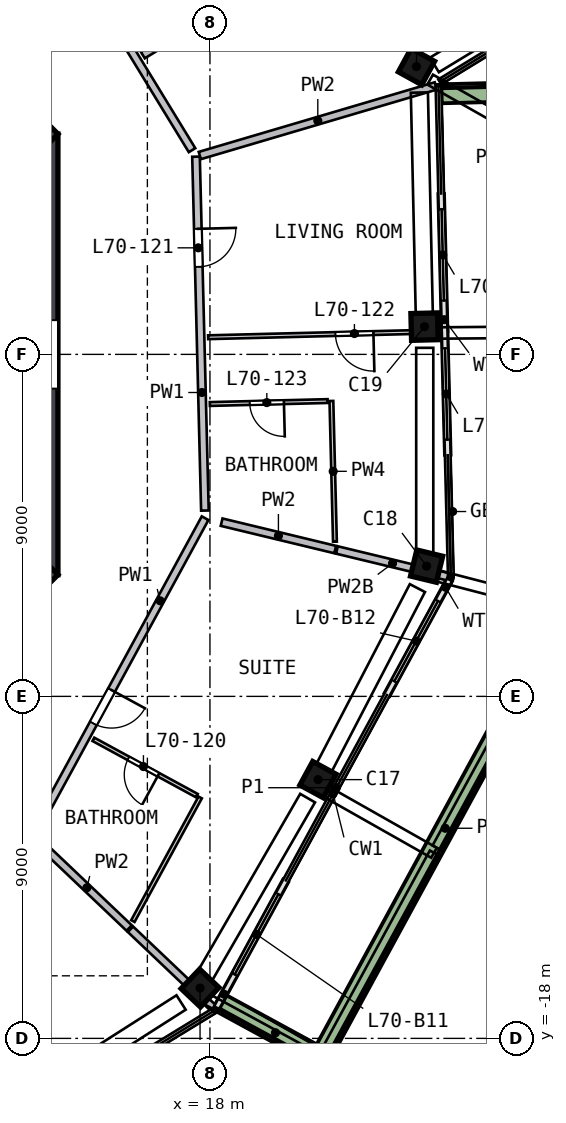
"""IFC4 building model, lengths in metres.
Left out: names, types, materials, properties, quantities, classifications, styles, units other than length and angle.
Written with IfcOpenShell. Run it as: python <this file> out.ifc"""

import sys

from ifc_helpers import new_model, si_unit, direction, frame, frame_2d, origin, origin_2d, place, context, subcontext, project, spatial, rectangle, extrude, element, fill, save


model = new_model("IFC4")
c1 = context("Model", 3, precision=1e-05, world=origin(), true_north=direction((0.0, 1.0)))
c2 = subcontext(c1, "Body", "Model", "MODEL_VIEW")
j1 = project(units=[si_unit("LENGTHUNIT", "METRE"), si_unit("PLANEANGLEUNIT", "RADIAN")], contexts=[c1])
p1 = place(None, origin())
s1 = spatial("IfcSite", under=j1, at=p1, CompositionType="ELEMENT")
p2 = place(p1, origin())
s2 = spatial("IfcBuilding", under=s1, at=p2, CompositionType="ELEMENT")
p3 = place(p2, frame((0.0, 0.0, 284.5)))
s3 = spatial("IfcBuildingStorey", under=s2, at=p3, CompositionType="ELEMENT", Elevation=284.5)
p4 = place(p3, frame((17.644, -16.779, 0.0), z_axis=(0.079060431, 0.084609865, 0.993272681), x_axis=(-0.684283954, -0.719963223, 0.115794763)))
e1 = element("IfcColumn", 1, at=p4, inside=s3, PredefinedType="COLUMN", context=c2, shape_type="SweptSolid", body=[
    extrude(rectangle(XDim=0.7, YDim=0.7, at=origin_2d()), origin(), (0.0, 0.0, 1.0), 3.211),
])
p5 = place(p3, frame((20.78, -11.311, 0.0), z_axis=(0.053005442, 0.099318662, 0.993642907), x_axis=(0.475262413, 0.872612609, -0.112573854)))
e2 = element("IfcColumn", 2, at=p5, inside=s3, PredefinedType="COLUMN", context=c2, shape_type="SweptSolid", body=[
    extrude(rectangle(XDim=0.7, YDim=0.7, at=origin_2d()), origin(), (0.0, 0.0, 1.0), 3.21),
])
p6 = place(p3, frame((23.669, -5.709, 0.0), z_axis=(0.026226708, 0.112812856, 0.993270064), x_axis=(-0.233123432, -0.96552568, 0.115817212)))
e3 = element("IfcColumn", 3, at=p6, inside=s3, PredefinedType="COLUMN", context=c2, shape_type="SweptSolid", body=[
    extrude(rectangle(XDim=0.7, YDim=0.7, at=origin_2d()), origin(), (0.0, 0.0, 1.0), 3.212),
])
p7 = place(p3, frame((23.651, 0.594, 0.0), z_axis=(-0.003726368, 0.112475484, 0.993647513), x_axis=(-0.024473849, 0.993346521, -0.112533195)))
e4 = element("IfcColumn", 4, at=p7, inside=s3, PredefinedType="COLUMN", context=c2, shape_type="SweptSolid", body=[
    extrude(rectangle(XDim=0.7, YDim=0.7, at=origin_2d()), origin(), (0.0, 0.0, 1.0), 3.21),
])
p8 = place(p3, frame((23.479, 7.439, 0.0), z_axis=(-0.036255778, 0.111351605, 0.993119499), x_axis=(-0.482935989, -0.871980865, 0.080138642)))
e5 = element("IfcColumn", 5, at=p8, inside=s3, PredefinedType="COLUMN", context=c2, shape_type="SweptSolid", body=[
    extrude(rectangle(XDim=0.7, YDim=0.7, at=origin_2d()), origin(), (0.0, 0.0, 1.0), 3.212),
])
p9 = place(p3, frame((13.775, -5.799, 0.0), z_axis=(0.0, 0.0, 1.0), x_axis=(0.0, 1.0, 0.0)))
e6 = element("IfcWall", 6, at=p9, inside=s3, PredefinedType="SHEAR", context=c2, shape_type="SweptSolid", body=[
    extrude(rectangle(XDim=11.598, YDim=0.45, at=frame_2d((5.799, 0.0))), origin(), (0.0, 0.0, 1.0), 3.5),
])
p10 = place(p9, frame((4.899, 0.0, 0.0)))
e7 = element("IfcOpeningElement", 7, at=p10, cuts=e6, PredefinedType="OPENING", context=c2, shape_type="SweptSolid", body=[
    extrude(rectangle(XDim=1.8, YDim=2.1, at=frame_2d((0.9, 1.05))), frame((0.0, 0.235, 0.0), z_axis=(0.0, -1.0, 0.0), x_axis=(1.0, 0.0, 0.0)), (0.0, 0.0, 1.0), 0.47),
])
p11 = place(p3, frame((13.841, 5.64, 0.0), z_axis=(0.0, 0.0, 1.0), x_axis=(-0.707106781, 0.707106781, 0.0)))
e8 = element("IfcWall", 8, at=p11, inside=s3, PredefinedType="SHEAR", context=c2, shape_type="SweptSolid", body=[
    extrude(rectangle(XDim=11.598, YDim=0.45, at=frame_2d((5.799, 0.0))), origin(), (0.0, 0.0, 1.0), 3.5),
])
p12 = place(p11, frame((2.099, 0.0, 0.0)))
e9 = element("IfcOpeningElement", 9, at=p12, cuts=e8, PredefinedType="OPENING", context=c2, shape_type="SweptSolid", body=[
    extrude(rectangle(XDim=1.2, YDim=2.1, at=frame_2d((0.6, 1.05))), frame((0.0, 0.235, 0.0), z_axis=(0.0, -1.0, 0.0), x_axis=(1.0, 0.0, 0.0)), (0.0, 0.0, 1.0), 0.47),
])
p13 = place(p3, frame((5.64, -13.841, 0.0), z_axis=(0.0, 0.0, 1.0), x_axis=(0.707106781, 0.707106781, 0.0)))
e10 = element("IfcWall", 10, at=p13, inside=s3, PredefinedType="SHEAR", context=c2, shape_type="SweptSolid", body=[
    extrude(rectangle(XDim=11.598, YDim=0.45, at=frame_2d((5.799, 0.0))), origin(), (0.0, 0.0, 1.0), 3.5),
])
p14 = place(p13, frame((2.099, 0.0, 0.0)))
e11 = element("IfcOpeningElement", 11, at=p14, cuts=e10, PredefinedType="OPENING", context=c2, shape_type="SweptSolid", body=[
    extrude(rectangle(XDim=1.2, YDim=2.1, at=frame_2d((0.6, 1.05))), frame((0.0, 0.235, 0.0), z_axis=(0.0, -1.0, 0.0), x_axis=(1.0, 0.0, 0.0)), (0.0, 0.0, 1.0), 0.47),
])
p15 = place(p3, frame((18.181, -17.183, 0.0), z_axis=(0.0, 0.0, 1.0), x_axis=(0.478120193, 0.878294416, 0.0)))
e12 = element("IfcWall", 12, at=p15, inside=s3, PredefinedType="SOLIDWALL", context=c2, shape_type="SweptSolid", body=[
    extrude(rectangle(XDim=3.787, YDim=0.15, at=frame_2d((1.894, 0.0))), origin(), (0.0, 0.0, 1.0), 2.525),
])
p16 = place(p15, frame((0.987, 0.0, 0.0)))
e13 = element("IfcOpeningElement", 13, at=p16, cuts=e12, PredefinedType="OPENING", context=c2, shape_type="SweptSolid", body=[
    extrude(rectangle(XDim=2.4, YDim=2.4, at=frame_2d((1.2, 1.2))), frame((0.0, 0.085, 0.0), z_axis=(0.0, -1.0, 0.0), x_axis=(1.0, 0.0, 0.0)), (0.0, 0.0, 1.0), 0.17),
])
p17 = place(p3, frame((22.662, -8.95, 0.0), z_axis=(0.0, 0.0, 1.0), x_axis=(0.478118196, 0.878295503, 0.0)))
e14 = element("IfcWall", 14, at=p17, inside=s3, PredefinedType="SOLIDWALL", context=c2, shape_type="SweptSolid", body=[
    extrude(rectangle(XDim=3.427, YDim=0.15, at=frame_2d((1.713, 0.0))), origin(), (0.0, 0.0, 1.0), 2.525),
])
p18 = place(p17, frame((0.4, 0.0, 0.0)))
e15 = element("IfcOpeningElement", 15, at=p18, cuts=e14, PredefinedType="OPENING", context=c2, shape_type="SweptSolid", body=[
    extrude(rectangle(XDim=2.4, YDim=2.4, at=frame_2d((1.2, 1.2))), frame((0.0, 0.085, 0.0), z_axis=(0.0, -1.0, 0.0), x_axis=(1.0, 0.0, 0.0)), (0.0, 0.0, 1.0), 0.17),
])
p19 = place(p3, frame((24.257, -2.641, 0.0), z_axis=(0.0, 0.0, 1.0), x_axis=(-0.025089785, 0.999685202, 0.0)))
e16 = element("IfcWall", 16, at=p19, inside=s3, PredefinedType="SOLIDWALL", context=c2, shape_type="SweptSolid", body=[
    extrude(rectangle(XDim=3.25, YDim=0.15, at=frame_2d((1.625, 0.0))), origin(), (0.0, 0.0, 1.0), 2.525),
])
p20 = place(p19, frame((0.4, 0.0, 0.0)))
e17 = element("IfcOpeningElement", 17, at=p20, cuts=e16, PredefinedType="OPENING", context=c2, shape_type="SweptSolid", body=[
    extrude(rectangle(XDim=2.4, YDim=2.4, at=frame_2d((1.2, 1.2))), frame((0.0, 0.085, 0.0), z_axis=(0.0, -1.0, 0.0), x_axis=(1.0, 0.0, 0.0)), (0.0, 0.0, 1.0), 0.17),
])
p21 = place(p3, frame((24.176, 0.608, 0.0), z_axis=(0.0, 0.0, 1.0), x_axis=(-0.025149276, 0.999683707, 0.0)))
e18 = element("IfcWall", 18, at=p21, inside=s3, PredefinedType="SOLIDWALL", context=c2, shape_type="SweptSolid", body=[
    extrude(rectangle(XDim=3.611, YDim=0.15, at=frame_2d((1.806, 0.0))), origin(), (0.0, 0.0, 1.0), 2.525),
])
p22 = place(p21, frame((0.811, 0.0, 0.0)))
e19 = element("IfcOpeningElement", 19, at=p22, cuts=e18, PredefinedType="OPENING", context=c2, shape_type="SweptSolid", body=[
    extrude(rectangle(XDim=2.4, YDim=2.4, at=frame_2d((1.2, 1.2))), frame((0.0, 0.085, 0.0), z_axis=(0.0, -1.0, 0.0), x_axis=(1.0, 0.0, 0.0)), (0.0, 0.0, 1.0), 0.17),
])
p23 = place(p3, frame((18.319, -17.087, 0.0), z_axis=(0.0, 0.0, 1.0), x_axis=(0.878332693, -0.478049873, 0.0)))
e20 = element("IfcWall", 20, at=p23, inside=s3, PredefinedType="SOLIDWALL", context=c2, shape_type="SweptSolid", body=[
    extrude(rectangle(XDim=3.199, YDim=0.5, at=frame_2d((1.6, 0.0))), origin(), (0.0, 0.0, 1.0), 0.7),
])
p24 = place(p3, frame((21.029, -18.278, 0.0), z_axis=(0.0, 0.0, 1.0), x_axis=(0.478078384, 0.878317174, 0.0)))
e21 = element("IfcWall", 21, at=p24, inside=s3, PredefinedType="SOLIDWALL", context=c2, shape_type="SweptSolid", body=[
    extrude(rectangle(XDim=13.223, YDim=0.5, at=frame_2d((6.612, 0.0))), origin(), (0.0, 0.0, 1.0), 0.7),
])
p25 = place(p3, frame((26.793, 6.926, 0.0), z_axis=(0.0, 0.0, 1.0), x_axis=(-0.999683736, -0.025148138, 0.0)))
e22 = element("IfcWall", 22, at=p25, inside=s3, PredefinedType="SOLIDWALL", context=c2, shape_type="SweptSolid", body=[
    extrude(rectangle(XDim=2.699, YDim=0.5, at=frame_2d((1.349, 0.0))), origin(), (0.0, 0.0, 1.0), 0.7),
])
p26 = place(p3, frame((12.669, 13.323, 0.0), z_axis=(0.0, 0.0, 1.0), x_axis=(0.521611117, -0.853183358, 0.0)))
e23 = element("IfcWall", 23, at=p26, inside=s3, PredefinedType="SOLIDWALL", context=c2, shape_type="SweptSolid", body=[
    extrude(rectangle(XDim=9.317, YDim=0.2, at=frame_2d((4.658, 0.0))), origin(), (0.0, 0.0, 1.0), 3.19),
])
p27 = place(p26, frame((3.865, 0.0, 0.0)))
e24 = element("IfcOpeningElement", 24, at=p27, cuts=e23, PredefinedType="OPENING", context=c2, shape_type="SweptSolid", body=[
    extrude(rectangle(XDim=1.8, YDim=2.1, at=frame_2d((0.9, 1.05))), frame((0.0, 0.11, 0.0), z_axis=(0.0, -1.0, 0.0), x_axis=(1.0, 0.0, 0.0)), (0.0, 0.0, 1.0), 0.22),
])
p28 = place(p3, frame((17.872, -4.311, 0.0), z_axis=(0.0, 0.0, 1.0), x_axis=(-0.478084491, -0.87831385, 0.0)))
e25 = element("IfcWall", 25, at=p28, inside=s3, PredefinedType="SOLIDWALL", context=c2, shape_type="SweptSolid", body=[
    extrude(rectangle(XDim=9.317, YDim=0.2, at=frame_2d((4.658, 0.0))), origin(), (0.0, 0.0, 1.0), 3.19),
])
p29 = place(p28, frame((5.15, 0.0, 0.0)))
e26 = element("IfcOpeningElement", 26, at=p29, cuts=e25, PredefinedType="OPENING", context=c2, shape_type="SweptSolid", body=[
    extrude(rectangle(XDim=1.0, YDim=2.1, at=frame_2d((0.5, 1.05))), frame((0.0, 0.11, 0.0), z_axis=(0.0, -1.0, 0.0), x_axis=(1.0, 0.0, 0.0)), (0.0, 0.0, 1.0), 0.22),
])
p30 = place(p3, frame((17.633, 5.203, 0.0), z_axis=(0.0, 0.0, 1.0), x_axis=(0.025130335, -0.999684183, 0.0)))
e27 = element("IfcWall", 27, at=p30, inside=s3, PredefinedType="SOLIDWALL", context=c2, shape_type="SweptSolid", body=[
    extrude(rectangle(XDim=9.317, YDim=0.2, at=frame_2d((4.658, 0.0))), origin(), (0.0, 0.0, 1.0), 3.19),
])
p31 = place(p30, frame((1.9, 0.0, 0.0)))
e28 = element("IfcOpeningElement", 28, at=p31, cuts=e27, PredefinedType="OPENING", context=c2, shape_type="SweptSolid", body=[
    extrude(rectangle(XDim=1.0, YDim=2.1, at=frame_2d((0.5, 1.05))), frame((0.0, 0.11, 0.0), z_axis=(0.0, -1.0, 0.0), x_axis=(1.0, 0.0, 0.0)), (0.0, 0.0, 1.0), 0.22),
])
p32 = place(p3, frame((13.647, -12.977, 0.0), z_axis=(0.0, 0.0, 1.0), x_axis=(0.724630592, -0.689137509, 0.0)))
e29 = element("IfcWall", 29, at=p32, inside=s3, PredefinedType="SOLIDWALL", context=c2, shape_type="SweptSolid", body=[
    extrude(rectangle(XDim=3.075, YDim=0.2, at=frame_2d((1.537, 0.0))), origin(), (0.0, 0.0, 1.0), 3.19),
])
p33 = place(p3, frame((15.908, -15.128, 0.0), z_axis=(0.0, 0.0, 1.0), x_axis=(0.724639029, -0.689128636, 0.0)))
e30 = element("IfcWall", 30, at=p33, inside=s3, PredefinedType="SOLIDWALL", context=c2, shape_type="SweptSolid", body=[
    extrude(rectangle(XDim=3.011, YDim=0.2, at=frame_2d((1.506, 0.0))), origin(), (0.0, 0.0, 1.0), 3.19),
])
p34 = place(p3, frame((18.307, -4.415, 0.0), z_axis=(0.0, 0.0, 1.0), x_axis=(0.972122163, -0.234474945, 0.0)))
e31 = element("IfcWall", 31, at=p34, inside=s3, PredefinedType="SOLIDWALL", context=c2, shape_type="SweptSolid", body=[
    extrude(rectangle(XDim=3.075, YDim=0.2, at=frame_2d((1.537, 0.0))), origin(), (0.0, 0.0, 1.0), 3.19),
])
p35 = place(p3, frame((24.98, 13.223, 0.0), z_axis=(0.0, 0.0, 1.0), x_axis=(-0.853195879, -0.521590637, 0.0)))
e32 = element("IfcWall", 32, at=p35, inside=s3, PredefinedType="SOLIDWALL", context=c2, shape_type="SweptSolid", body=[
    extrude(rectangle(XDim=10.252, YDim=0.2, at=frame_2d((5.126, 0.0))), origin(), (0.0, 0.0, 1.0), 3.19),
])
p36 = place(p35, frame((2.45, 0.0, 0.0)))
e33 = element("IfcOpeningElement", 33, at=p36, cuts=e32, PredefinedType="OPENING", context=c2, shape_type="SweptSolid", body=[
    extrude(rectangle(XDim=1.0, YDim=2.1, at=frame_2d((0.5, 1.05))), frame((0.0, 0.11, 0.0), z_axis=(0.0, -1.0, 0.0), x_axis=(1.0, 0.0, 0.0)), (0.0, 0.0, 1.0), 0.22),
])
p37 = place(p3, frame((23.944, 7.065, 0.0), z_axis=(0.0, 0.0, 1.0), x_axis=(-0.9591166, -0.283011215, 0.0)))
e34 = element("IfcWall", 34, at=p37, inside=s3, PredefinedType="SOLIDWALL", context=c2, shape_type="SweptSolid", body=[
    extrude(rectangle(XDim=6.476, YDim=0.2, at=frame_2d((3.238, 0.0))), origin(), (0.0, 0.0, 1.0), 3.19),
])
p38 = place(p3, frame((21.341, -5.147, 0.0), z_axis=(0.0, 0.0, 1.0), x_axis=(0.972121732, -0.234476735, 0.0)))
e35 = element("IfcWall", 35, at=p38, inside=s3, PredefinedType="SOLIDWALL", context=c2, shape_type="SweptSolid", body=[
    extrude(rectangle(XDim=3.011, YDim=0.2, at=frame_2d((1.506, 0.0))), origin(), (0.0, 0.0, 1.0), 2.69),
])
p39 = place(p3, frame((17.655, -11.612, 0.0), z_axis=(0.0, 0.0, 1.0), x_axis=(-0.87832263, 0.478068361, 0.0)))
e36 = element("IfcWall", 36, at=p39, inside=s3, PredefinedType="PARTITIONING", context=c2, shape_type="SweptSolid", body=[
    extrude(rectangle(XDim=3.1, YDim=0.1, at=frame_2d((1.55, 0.0))), origin(), (0.0, 0.0, 1.0), 3.19),
])
p40 = place(p39, frame((1.15, 0.0, 0.0)))
e37 = element("IfcOpeningElement", 37, at=p40, cuts=e36, PredefinedType="OPENING", context=c2, shape_type="SweptSolid", body=[
    extrude(rectangle(XDim=0.9, YDim=2.1, at=frame_2d((0.45, 1.05))), frame((0.0, 0.06, 0.0), z_axis=(0.0, -1.0, 0.0), x_axis=(1.0, 0.0, 0.0)), (0.0, 0.0, 1.0), 0.12),
])
p41 = place(p3, frame((17.743, -11.66, 0.0), z_axis=(0.0, 0.0, 1.0), x_axis=(-0.478053023, -0.878330978, 0.0)))
e38 = element("IfcWall", 38, at=p41, inside=s3, PredefinedType="PARTITIONING", context=c2, shape_type="SweptSolid", body=[
    extrude(rectangle(XDim=3.704, YDim=0.1, at=frame_2d((1.852, 0.0))), origin(), (0.0, 0.0, 1.0), 3.19),
])
p42 = place(p3, frame((21.096, -1.229, 0.0), z_axis=(0.0, 0.0, 1.0), x_axis=(-0.999684391, -0.025122051, 0.0)))
e39 = element("IfcWall", 39, at=p42, inside=s3, PredefinedType="PARTITIONING", context=c2, shape_type="SweptSolid", body=[
    extrude(rectangle(XDim=3.1, YDim=0.1, at=frame_2d((1.55, 0.0))), origin(), (0.0, 0.0, 1.0), 3.19),
])
p43 = place(p42, frame((1.15, 0.0, 0.0)))
e40 = element("IfcOpeningElement", 40, at=p43, cuts=e39, PredefinedType="OPENING", context=c2, shape_type="SweptSolid", body=[
    extrude(rectangle(XDim=0.9, YDim=2.1, at=frame_2d((0.45, 1.05))), frame((0.0, 0.06, 0.0), z_axis=(0.0, -1.0, 0.0), x_axis=(1.0, 0.0, 0.0)), (0.0, 0.0, 1.0), 0.12),
])
p44 = place(p3, frame((24.101, 0.606, 0.0), z_axis=(0.0, 0.0, 1.0), x_axis=(-0.999685212, -0.025089391, 0.0)))
e41 = element("IfcWall", 41, at=p44, inside=s3, PredefinedType="PARTITIONING", context=c2, shape_type="SweptSolid", body=[
    extrude(rectangle(XDim=6.15, YDim=0.1, at=frame_2d((3.075, 0.0))), origin(), (0.0, 0.0, 1.0), 3.19),
])
p45 = place(p44, frame((1.8, 0.0, 0.0)))
e42 = element("IfcOpeningElement", 42, at=p45, cuts=e41, PredefinedType="OPENING", context=c2, shape_type="SweptSolid", body=[
    extrude(rectangle(XDim=1.0, YDim=2.1, at=frame_2d((0.5, 1.05))), frame((0.0, 0.06, 0.0), z_axis=(0.0, -1.0, 0.0), x_axis=(1.0, 0.0, 0.0)), (0.0, 0.0, 1.0), 0.12),
])
p46 = place(p3, frame((21.289, -4.929, 0.0), z_axis=(0.0, 0.0, 1.0), x_axis=(-0.025112405, 0.999684634, 0.0)))
e43 = element("IfcWall", 43, at=p46, inside=s3, PredefinedType="PARTITIONING", context=c2, shape_type="SweptSolid", body=[
    extrude(rectangle(XDim=3.704, YDim=0.1, at=frame_2d((1.852, 0.0))), origin(), (0.0, 0.0, 1.0), 3.19),
])
p47 = place(p16, origin())
e44 = element("IfcDoor", 44, at=p47, inside=s3, OperationType="SLIDING_TO_LEFT", PredefinedType="DOOR", context=c2, shape_type="SweptSolid", body=[
    extrude(rectangle(XDim=2.4, YDim=2.4, at=frame_2d((1.2, 1.2))), frame((0.0, 0.025, 0.0), z_axis=(0.0, -1.0, 0.0), x_axis=(1.0, 0.0, 0.0)), (0.0, 0.0, 1.0), 0.05),
])
fill(e13, e44)
p48 = place(p18, origin())
e45 = element("IfcDoor", 45, at=p48, inside=s3, OperationType="SLIDING_TO_RIGHT", PredefinedType="DOOR", context=c2, shape_type="SweptSolid", body=[
    extrude(rectangle(XDim=2.4, YDim=2.4, at=frame_2d((1.2, 1.2))), frame((0.0, 0.025, 0.0), z_axis=(0.0, -1.0, 0.0), x_axis=(1.0, 0.0, 0.0)), (0.0, 0.0, 1.0), 0.05),
])
fill(e15, e45)
p49 = place(p20, origin())
e46 = element("IfcDoor", 46, at=p49, inside=s3, OperationType="SLIDING_TO_RIGHT", PredefinedType="DOOR", context=c2, shape_type="SweptSolid", body=[
    extrude(rectangle(XDim=2.4, YDim=2.4, at=frame_2d((1.2, 1.2))), frame((0.0, 0.025, 0.0), z_axis=(0.0, -1.0, 0.0), x_axis=(1.0, 0.0, 0.0)), (0.0, 0.0, 1.0), 0.05),
])
fill(e17, e46)
p50 = place(p22, origin())
e47 = element("IfcDoor", 47, at=p50, inside=s3, OperationType="SLIDING_TO_LEFT", PredefinedType="DOOR", context=c2, shape_type="SweptSolid", body=[
    extrude(rectangle(XDim=2.4, YDim=2.4, at=frame_2d((1.2, 1.2))), frame((0.0, 0.025, 0.0), z_axis=(0.0, -1.0, 0.0), x_axis=(1.0, 0.0, 0.0)), (0.0, 0.0, 1.0), 0.05),
])
fill(e19, e47)
p51 = place(p29, origin())
e48 = element("IfcDoor", 48, at=p51, inside=s3, OperationType="SINGLE_SWING_LEFT", PredefinedType="DOOR", context=c2, shape_type="SweptSolid", body=[
    extrude(rectangle(XDim=1.0, YDim=2.1, at=frame_2d((0.5, 1.05))), frame((0.0, 0.025, 0.0), z_axis=(0.0, -1.0, 0.0), x_axis=(1.0, 0.0, 0.0)), (0.0, 0.0, 1.0), 0.05),
])
fill(e26, e48)
p52 = place(p40, origin())
e49 = element("IfcDoor", 49, at=p52, inside=s3, OperationType="SINGLE_SWING_LEFT", PredefinedType="DOOR", context=c2, shape_type="SweptSolid", body=[
    extrude(rectangle(XDim=0.9, YDim=2.1, at=frame_2d((0.45, 1.05))), frame((0.0, 0.025, 0.0), z_axis=(0.0, -1.0, 0.0), x_axis=(1.0, 0.0, 0.0)), (0.0, 0.0, 1.0), 0.05),
])
fill(e37, e49)
p53 = place(p31, origin())
e50 = element("IfcDoor", 50, at=p53, inside=s3, OperationType="SINGLE_SWING_LEFT", PredefinedType="DOOR", context=c2, shape_type="SweptSolid", body=[
    extrude(rectangle(XDim=1.0, YDim=2.1, at=frame_2d((0.5, 1.05))), frame((0.0, 0.025, 0.0), z_axis=(0.0, -1.0, 0.0), x_axis=(1.0, 0.0, 0.0)), (0.0, 0.0, 1.0), 0.05),
])
fill(e28, e50)
p54 = place(p45, origin())
e51 = element("IfcDoor", 51, at=p54, inside=s3, OperationType="SINGLE_SWING_LEFT", PredefinedType="DOOR", context=c2, shape_type="SweptSolid", body=[
    extrude(rectangle(XDim=1.0, YDim=2.1, at=frame_2d((0.5, 1.05))), frame((0.0, 0.025, 0.0), z_axis=(0.0, -1.0, 0.0), x_axis=(1.0, 0.0, 0.0)), (0.0, 0.0, 1.0), 0.05),
])
fill(e42, e51)
p55 = place(p43, origin())
e52 = element("IfcDoor", 52, at=p55, inside=s3, OperationType="SINGLE_SWING_LEFT", PredefinedType="DOOR", context=c2, shape_type="SweptSolid", body=[
    extrude(rectangle(XDim=0.9, YDim=2.1, at=frame_2d((0.45, 1.05))), frame((0.0, 0.025, 0.0), z_axis=(0.0, -1.0, 0.0), x_axis=(1.0, 0.0, 0.0)), (0.0, 0.0, 1.0), 0.05),
])
fill(e40, e52)
save(model, sys.argv[1])
